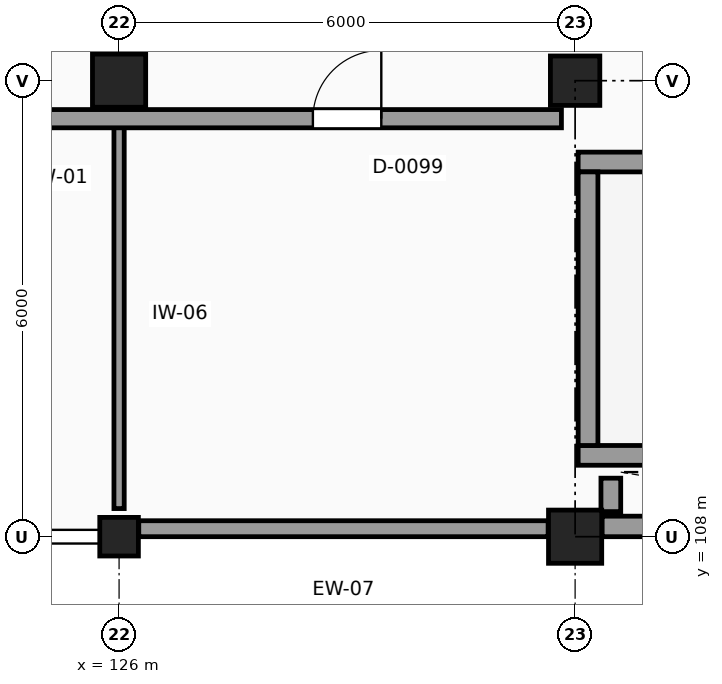
"""IFC4 building model, lengths in metres.
Left out: names, types, materials, properties, quantities, classifications, styles, units other than length and angle.
Written with IfcOpenShell. Run it as: python <this file> out.ifc"""

import sys

from ifc_helpers import new_model, si_unit, direction, frame, frame_2d, origin, origin_2d, place, context, subcontext, project, spatial, rectangle, hollow_circle, extrude, element, fill, save


model = new_model("IFC4")
c1 = context("Model", 3, precision=1e-05, world=origin(), true_north=direction((0.0, 1.0)))
c2 = subcontext(c1, "Body", "Model", "MODEL_VIEW")
j1 = project(units=[si_unit("LENGTHUNIT", "METRE"), si_unit("PLANEANGLEUNIT", "RADIAN")], contexts=[c1])
p1 = place(None, origin())
s1 = spatial("IfcSite", under=j1, at=p1, CompositionType="ELEMENT")
p2 = place(p1, origin())
s2 = spatial("IfcBuilding", under=s1, at=p2, CompositionType="ELEMENT")
p3 = place(p2, frame((0.0, 0.0, 10.5)))
s3 = spatial("IfcBuildingStorey", under=s2, at=p3, CompositionType="ELEMENT", Elevation=10.5)
p4 = place(p3, frame((126.0, 108.0, 0.0), z_axis=(0.0, 0.0, 1.0), x_axis=(1.0, 0.0, 0.0)))
e1 = element("IfcColumn", 1, at=p4, inside=s3, PredefinedType="COLUMN", context=c2, shape_type="SweptSolid", body=[
    extrude(hollow_circle(Radius=0.254, WallThickness=0.025, at=origin_2d()), origin(), (0.0, 0.0, 1.0), 4.5),
])
for number, where, z_axis, x_axis in (
    (2, (126.0, 114.0, 0.0), (0.0, 0.0, 1.0), (1.0, 0.0, 0.0)),
    (3, (132.0, 108.0, 0.0), (0.0, 0.0, 1.0), (1.0, 0.0, 0.0)),
):
    element("IfcColumn", number, at=place(p3, frame(where, z_axis=z_axis, x_axis=x_axis)), inside=s3, PredefinedType="COLUMN", context=c2, shape_type="SweptSolid", body=[
        extrude(rectangle(XDim=0.7, YDim=0.7, at=origin_2d()), origin(), (0.0, 0.0, 1.0), 4.5),
    ])
p5 = place(p3, frame((132.0, 114.0, 0.0), z_axis=(0.0, 0.0, 1.0), x_axis=(1.0, 0.0, 0.0)))
e4 = element("IfcColumn", 4, at=p5, inside=s3, PredefinedType="COLUMN", context=c2, shape_type="SweptSolid", body=[
    extrude(rectangle(XDim=0.65, YDim=0.65, at=origin_2d()), origin(), (0.0, 0.0, 1.0), 4.5),
])
p6 = place(p3, frame((126.259, 108.105, 0.0), z_axis=(0.0, 0.0, 1.0), x_axis=(1.0, 0.0, 0.0)))
e5 = element("IfcWall", 5, at=p6, inside=s3, PredefinedType="SOLIDWALL", context=c2, shape_type="SweptSolid", body=[
    extrude(rectangle(XDim=5.386, YDim=0.21, at=frame_2d((2.693, 0.0))), origin(), (0.0, 0.0, 1.0), 3.49),
])
p7 = place(p3, frame((132.355, 108.135, 0.0), z_axis=(0.0, 0.0, 1.0), x_axis=(1.0, 0.0, 0.0)))
e6 = element("IfcWall", 6, at=p7, inside=s3, PredefinedType="SOLIDWALL", context=c2, shape_type="SweptSolid", body=[
    extrude(rectangle(XDim=5.315, YDim=0.27, at=frame_2d((2.657, 0.0))), origin(), (0.0, 0.0, 1.0), 4.24),
])
for number, where, z_axis, x_axis in (
    (7, (132.04, 109.07, 0.0), (0.0, 0.0, 1.0), (1.0, 0.0, 0.0)),
    (8, (132.04, 112.93, 0.0), (0.0, 0.0, 1.0), (1.0, 0.0, 0.0)),
):
    element("IfcWall", number, at=place(p3, frame(where, z_axis=z_axis, x_axis=x_axis)), inside=s3, PredefinedType="SHEAR", context=c2, shape_type="SweptSolid", body=[
        extrude(rectangle(XDim=10.72, YDim=0.26, at=frame_2d((5.36, 0.0))), origin(), (0.0, 0.0, 1.0), 4.5),
    ])
p8 = place(p3, frame((132.17, 109.2, 0.0), z_axis=(0.0, 0.0, 1.0), x_axis=(0.0, 1.0, 0.0)))
e9 = element("IfcWall", 9, at=p8, inside=s3, PredefinedType="SHEAR", context=c2, shape_type="SweptSolid", body=[
    extrude(rectangle(XDim=3.6, YDim=0.26, at=frame_2d((1.8, 0.0))), origin(), (0.0, 0.0, 1.0), 4.5),
])
p9 = place(p3, frame((132.47, 108.33, 0.0), z_axis=(0.0, 0.0, 1.0), x_axis=(0.0, 1.0, 0.0)))
e10 = element("IfcWall", 10, at=p9, inside=s3, PredefinedType="SHEAR", context=c2, shape_type="SweptSolid", body=[
    extrude(rectangle(XDim=0.44, YDim=0.26, at=frame_2d((0.22, 0.0))), origin(), (0.0, 0.0, 1.0), 4.5),
])
p10 = place(p3, frame((126.0, 108.37, 0.0), z_axis=(0.0, 0.0, 1.0), x_axis=(0.0, 1.0, 0.0)))
e11 = element("IfcWall", 11, at=p10, inside=s3, PredefinedType="PARTITIONING", context=c2, shape_type="SweptSolid", body=[
    extrude(rectangle(XDim=5.13, YDim=0.135, at=frame_2d((2.565, 0.0))), origin(), (0.0, 0.0, 1.0), 3.54),
])
p11 = place(p3, frame((120.555, 113.5, 0.0), z_axis=(0.0, 0.0, 1.0), x_axis=(1.0, 0.0, 0.0)))
e12 = element("IfcWall", 12, at=p11, inside=s3, PredefinedType="PARTITIONING", context=c2, shape_type="SweptSolid", body=[
    extrude(rectangle(XDim=11.265, YDim=0.24, at=frame_2d((5.633, 0.0))), origin(), (0.0, 0.0, 1.0), 4.24),
])
p12 = place(p11, frame((1.995, 0.0, 0.0)))
e13 = element("IfcOpeningElement", 13, at=p12, cuts=e12, PredefinedType="OPENING", context=c2, shape_type="SweptSolid", body=[
    extrude(rectangle(XDim=0.9, YDim=2.1, at=frame_2d((0.45, 1.05))), frame((0.0, 0.13, 0.0), z_axis=(0.0, -1.0, 0.0), x_axis=(1.0, 0.0, 0.0)), (0.0, 0.0, 1.0), 0.26),
])
p13 = place(p11, frame((7.995, 0.0, 0.0)))
e14 = element("IfcOpeningElement", 14, at=p13, cuts=e12, PredefinedType="OPENING", context=c2, shape_type="SweptSolid", body=[
    extrude(rectangle(XDim=0.9, YDim=2.1, at=frame_2d((0.45, 1.05))), frame((0.0, 0.13, 0.0), z_axis=(0.0, -1.0, 0.0), x_axis=(1.0, 0.0, 0.0)), (0.0, 0.0, 1.0), 0.26),
])
p14 = place(p13, origin())
e15 = element("IfcDoor", 15, at=p14, inside=s3, OperationType="SINGLE_SWING_RIGHT", PredefinedType="DOOR", context=c2, shape_type="SweptSolid", body=[
    extrude(rectangle(XDim=0.9, YDim=2.1, at=frame_2d((0.45, 1.05))), frame((0.0, 0.025, 0.0), z_axis=(0.0, -1.0, 0.0), x_axis=(1.0, 0.0, 0.0)), (0.0, 0.0, 1.0), 0.05),
])
fill(e14, e15)
save(model, sys.argv[1])
